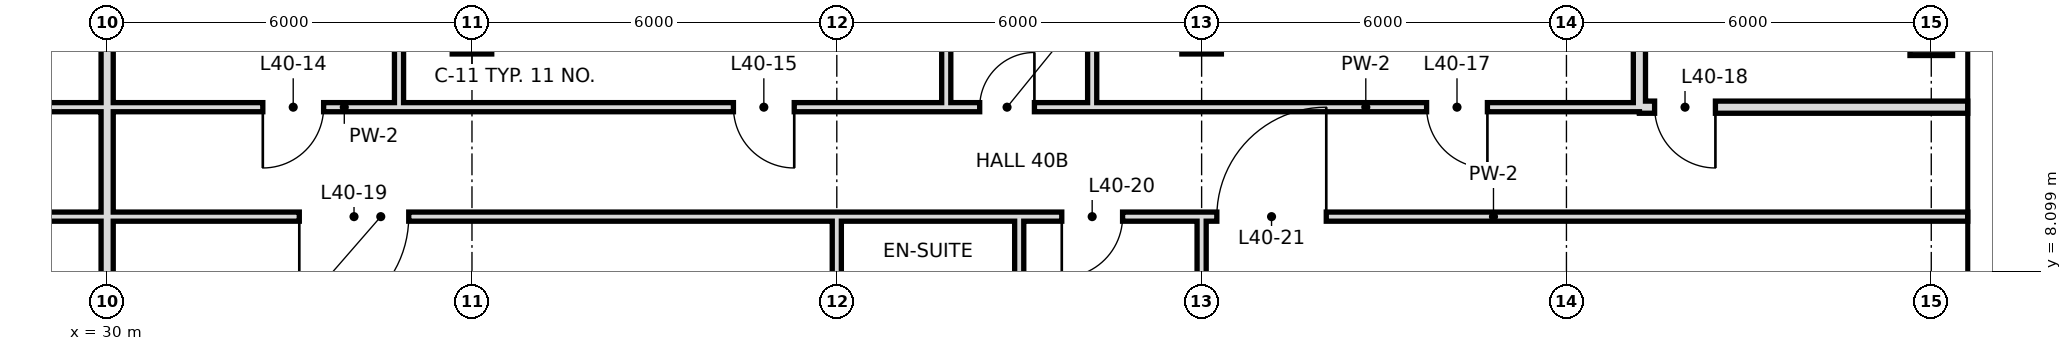
"""IFC4 building model, lengths in metres.
Left out: names, types, materials, properties, quantities, classifications, styles, units other than length and angle.
Written with IfcOpenShell. Run it as: python <this file> out.ifc"""

import sys

from ifc_helpers import new_model, si_unit, direction, frame, frame_2d, origin, origin_2d, place, context, subcontext, project, spatial, rectangle, hollow_rectangle, extrude, element, fill, save


model = new_model("IFC4")
c1 = context("Model", 3, precision=1e-05, world=origin(), true_north=direction((0.0, 1.0)))
c2 = subcontext(c1, "Body", "Model", "MODEL_VIEW")
j1 = project(units=[si_unit("LENGTHUNIT", "METRE"), si_unit("PLANEANGLEUNIT", "RADIAN")], contexts=[c1])
p1 = place(None, origin())
s1 = spatial("IfcSite", under=j1, at=p1, CompositionType="ELEMENT")
p2 = place(p1, origin())
s2 = spatial("IfcBuilding", under=s1, at=p2, CompositionType="ELEMENT")
p3 = place(p2, frame((0.0, 0.0, 174.4)))
s3 = spatial("IfcBuildingStorey", under=s2, at=p3, CompositionType="ELEMENT", Elevation=174.4)
for number, where, z_axis, x_axis in (
    (1, (36.0, 12.0, 0.0), (0.0, 0.0, 1.0), (1.0, 0.0, 0.0)),
    (2, (48.0, 12.0, 0.0), (0.0, 0.0, 1.0), (1.0, 0.0, 0.0)),
):
    element("IfcColumn", number, at=place(p3, frame(where, z_axis=z_axis, x_axis=x_axis)), inside=s3, PredefinedType="COLUMN", context=c2, shape_type="SweptSolid", body=[
        extrude(hollow_rectangle(XDim=0.65, YDim=0.65, WallThickness=0.032, at=origin_2d()), origin(), (0.0, 0.0, 1.0), 3.6),
    ])
p4 = place(p3, frame((60.0, 12.0, 0.0), z_axis=(0.0, 0.0, 1.0), x_axis=(1.0, 0.0, 0.0)))
e3 = element("IfcColumn", 3, at=p4, inside=s3, PredefinedType="COLUMN", context=c2, shape_type="SweptSolid", body=[
    extrude(hollow_rectangle(XDim=0.7, YDim=0.7, WallThickness=0.036, at=origin_2d()), origin(), (0.0, 0.0, 1.0), 3.6),
])
p5 = place(p3, frame((30.0, -0.6, 0.0), z_axis=(0.0, 0.0, 1.0), x_axis=(0.0, 1.0, 0.0)))
e4 = element("IfcWall", 4, at=p5, inside=s3, PredefinedType="SOLIDWALL", context=c2, shape_type="SweptSolid", body=[
    extrude(rectangle(XDim=15.9, YDim=0.2, at=frame_2d((7.95, 0.0))), origin(), (0.0, 0.0, 1.0), 2.72),
])
p6 = place(p3, frame((34.8, 10.8, 0.0), z_axis=(0.0, 0.0, 1.0), x_axis=(0.0, 1.0, 0.0)))
e5 = element("IfcWall", 5, at=p6, inside=s3, PredefinedType="PARTITIONING", context=c2, shape_type="SweptSolid", body=[
    extrude(rectangle(XDim=4.5, YDim=0.15, at=frame_2d((2.25, 0.0))), origin(), (0.0, 0.0, 1.0), 3.42),
])
p7 = place(p3, frame((42.0, 6.0, 0.0), z_axis=(0.0, 0.0, 1.0), x_axis=(0.0, 1.0, 0.0)))
e6 = element("IfcWall", 6, at=p7, inside=s3, PredefinedType="PARTITIONING", context=c2, shape_type="SweptSolid", body=[
    extrude(rectangle(XDim=3.0, YDim=0.15, at=frame_2d((1.5, 0.0))), origin(), (0.0, 0.0, 1.0), 2.72),
])
p8 = place(p3, frame((43.8, 10.8, 0.0), z_axis=(0.0, 0.0, 1.0), x_axis=(0.0, 1.0, 0.0)))
e7 = element("IfcWall", 7, at=p8, inside=s3, PredefinedType="PARTITIONING", context=c2, shape_type="SweptSolid", body=[
    extrude(rectangle(XDim=4.5, YDim=0.15, at=frame_2d((2.25, 0.0))), origin(), (0.0, 0.0, 1.0), 3.42),
])
p9 = place(p3, frame((45.0, 6.0, 0.0), z_axis=(0.0, 0.0, 1.0), x_axis=(0.0, 1.0, 0.0)))
e8 = element("IfcWall", 8, at=p9, inside=s3, PredefinedType="PARTITIONING", context=c2, shape_type="SweptSolid", body=[
    extrude(rectangle(XDim=3.0, YDim=0.15, at=frame_2d((1.5, 0.0))), origin(), (0.0, 0.0, 1.0), 3.42),
])
p10 = place(p3, frame((46.2, 10.8, 0.0), z_axis=(0.0, 0.0, 1.0), x_axis=(0.0, 1.0, 0.0)))
e9 = element("IfcWall", 9, at=p10, inside=s3, PredefinedType="PARTITIONING", context=c2, shape_type="SweptSolid", body=[
    extrude(rectangle(XDim=4.5, YDim=0.15, at=frame_2d((2.25, 0.0))), origin(), (0.0, 0.0, 1.0), 3.42),
])
p11 = place(p3, frame((48.0, 0.0, 0.0), z_axis=(0.0, 0.0, 1.0), x_axis=(0.0, 1.0, 0.0)))
e10 = element("IfcWall", 10, at=p11, inside=s3, PredefinedType="PARTITIONING", context=c2, shape_type="SweptSolid", body=[
    extrude(rectangle(XDim=9.0, YDim=0.15, at=frame_2d((4.5, 0.0))), origin(), (0.0, 0.0, 1.0), 2.72),
])
p12 = place(p3, frame((55.2, 10.8, 0.0), z_axis=(0.0, 0.0, 1.0), x_axis=(0.0, 1.0, 0.0)))
e11 = element("IfcWall", 11, at=p12, inside=s3, PredefinedType="SOLIDWALL", context=c2, shape_type="SweptSolid", body=[
    extrude(rectangle(XDim=7.2, YDim=0.2, at=frame_2d((3.6, 0.0))), origin(), (0.0, 0.0, 1.0), 2.72),
])
p13 = place(p3, frame((55.2, 10.8, 0.0), z_axis=(0.0, 0.0, 1.0), x_axis=(1.0, 0.0, 0.0)))
e12 = element("IfcWall", 12, at=p13, inside=s3, PredefinedType="SOLIDWALL", context=c2, shape_type="SweptSolid", body=[
    extrude(rectangle(XDim=5.4, YDim=0.2, at=frame_2d((2.7, 0.0))), origin(), (0.0, 0.0, 1.0), 2.97),
])
p14 = place(p13, frame((0.25, 0.0, 0.0)))
e13 = element("IfcOpeningElement", 13, at=p14, cuts=e12, PredefinedType="OPENING", context=c2, shape_type="SweptSolid", body=[
    extrude(rectangle(XDim=1.0, YDim=2.4, at=frame_2d((0.5, 1.2))), frame((0.0, 0.11, 0.0), z_axis=(0.0, -1.0, 0.0), x_axis=(1.0, 0.0, 0.0)), (0.0, 0.0, 1.0), 0.22),
])
p15 = place(p3, frame((24.0, 10.8, 0.0), z_axis=(0.0, 0.0, 1.0), x_axis=(1.0, 0.0, 0.0)))
e14 = element("IfcWall", 14, at=p15, inside=s3, PredefinedType="PARTITIONING", context=c2, shape_type="SweptSolid", body=[
    extrude(rectangle(XDim=19.8, YDim=0.15, at=frame_2d((9.9, 0.0))), origin(), (0.0, 0.0, 1.0), 3.42),
])
p16 = place(p15, frame((2.5, 0.0, 0.0)))
e15 = element("IfcOpeningElement", 15, at=p16, cuts=e14, PredefinedType="OPENING", context=c2, shape_type="SweptSolid", body=[
    extrude(rectangle(XDim=1.0, YDim=2.4, at=frame_2d((0.5, 1.2))), frame((0.0, 0.085, 0.0), z_axis=(0.0, -1.0, 0.0), x_axis=(1.0, 0.0, 0.0)), (0.0, 0.0, 1.0), 0.17),
])
p17 = place(p15, frame((8.56, 0.0, 0.0)))
e16 = element("IfcOpeningElement", 16, at=p17, cuts=e14, PredefinedType="OPENING", context=c2, shape_type="SweptSolid", body=[
    extrude(rectangle(XDim=1.0, YDim=2.4, at=frame_2d((0.5, 1.2))), frame((0.0, 0.085, 0.0), z_axis=(0.0, -1.0, 0.0), x_axis=(1.0, 0.0, 0.0)), (0.0, 0.0, 1.0), 0.17),
])
p18 = place(p15, frame((16.3, 0.0, 0.0)))
e17 = element("IfcOpeningElement", 17, at=p18, cuts=e14, PredefinedType="OPENING", context=c2, shape_type="SweptSolid", body=[
    extrude(rectangle(XDim=1.0, YDim=2.4, at=frame_2d((0.5, 1.2))), frame((0.0, 0.085, 0.0), z_axis=(0.0, -1.0, 0.0), x_axis=(1.0, 0.0, 0.0)), (0.0, 0.0, 1.0), 0.17),
])
p19 = place(p3, frame((46.2, 10.8, 0.0), z_axis=(0.0, 0.0, 1.0), x_axis=(1.0, 0.0, 0.0)))
e18 = element("IfcWall", 18, at=p19, inside=s3, PredefinedType="PARTITIONING", context=c2, shape_type="SweptSolid", body=[
    extrude(rectangle(XDim=9.0, YDim=0.15, at=frame_2d((4.5, 0.0))), origin(), (0.0, 0.0, 1.0), 3.42),
])
p20 = place(p19, frame((5.5, 0.0, 0.0)))
e19 = element("IfcOpeningElement", 19, at=p20, cuts=e18, PredefinedType="OPENING", context=c2, shape_type="SweptSolid", body=[
    extrude(rectangle(XDim=1.0, YDim=2.4, at=frame_2d((0.5, 1.2))), frame((0.0, 0.085, 0.0), z_axis=(0.0, -1.0, 0.0), x_axis=(1.0, 0.0, 0.0)), (0.0, 0.0, 1.0), 0.17),
])
p21 = place(p3, frame((43.8, 10.8, 0.0), z_axis=(0.0, 0.0, 1.0), x_axis=(1.0, 0.0, 0.0)))
e20 = element("IfcWall", 20, at=p21, inside=s3, PredefinedType="PARTITIONING", context=c2, shape_type="SweptSolid", body=[
    extrude(rectangle(XDim=2.4, YDim=0.15, at=frame_2d((1.2, 0.0))), origin(), (0.0, 0.0, 1.0), 3.42),
])
p22 = place(p21, frame((0.55, 0.0, 0.0)))
e21 = element("IfcOpeningElement", 21, at=p22, cuts=e20, PredefinedType="OPENING", context=c2, shape_type="SweptSolid", body=[
    extrude(rectangle(XDim=0.9, YDim=2.4, at=frame_2d((0.45, 1.2))), frame((0.0, 0.085, 0.0), z_axis=(0.0, -1.0, 0.0), x_axis=(1.0, 0.0, 0.0)), (0.0, 0.0, 1.0), 0.17),
])
p23 = place(p3, frame((27.0, 9.0, 0.0), z_axis=(0.0, 0.0, 1.0), x_axis=(1.0, 0.0, 0.0)))
e22 = element("IfcWall", 22, at=p23, inside=s3, PredefinedType="PARTITIONING", context=c2, shape_type="SweptSolid", body=[
    extrude(rectangle(XDim=15.0, YDim=0.15, at=frame_2d((7.5, 0.0))), origin(), (0.0, 0.0, 1.0), 3.42),
])
p24 = place(p23, frame((1.0, 0.0, 0.0)))
e23 = element("IfcOpeningElement", 23, at=p24, cuts=e22, PredefinedType="OPENING", context=c2, shape_type="SweptSolid", body=[
    extrude(rectangle(XDim=1.0, YDim=2.4, at=frame_2d((0.5, 1.2))), frame((0.0, 0.085, 0.0), z_axis=(0.0, -1.0, 0.0), x_axis=(1.0, 0.0, 0.0)), (0.0, 0.0, 1.0), 0.17),
])
p25 = place(p23, frame((6.16, 0.0, 0.0)))
e24 = element("IfcOpeningElement", 24, at=p25, cuts=e22, PredefinedType="OPENING", context=c2, shape_type="SweptSolid", body=[
    extrude(rectangle(XDim=1.8, YDim=2.4, at=frame_2d((0.9, 1.2))), frame((0.0, 0.085, 0.0), z_axis=(0.0, -1.0, 0.0), x_axis=(1.0, 0.0, 0.0)), (0.0, 0.0, 1.0), 0.17),
])
p26 = place(p3, frame((45.0, 9.0, 0.0), z_axis=(0.0, 0.0, 1.0), x_axis=(1.0, 0.0, 0.0)))
e25 = element("IfcWall", 25, at=p26, inside=s3, PredefinedType="PARTITIONING", context=c2, shape_type="SweptSolid", body=[
    extrude(rectangle(XDim=15.6, YDim=0.15, at=frame_2d((7.8, 0.0))), origin(), (0.0, 0.0, 1.0), 3.42),
])
p27 = place(p26, frame((0.7, 0.0, 0.0)))
e26 = element("IfcOpeningElement", 26, at=p27, cuts=e25, PredefinedType="OPENING", context=c2, shape_type="SweptSolid", body=[
    extrude(rectangle(XDim=1.0, YDim=2.4, at=frame_2d((0.5, 1.2))), frame((0.0, 0.085, 0.0), z_axis=(0.0, -1.0, 0.0), x_axis=(1.0, 0.0, 0.0)), (0.0, 0.0, 1.0), 0.17),
])
p28 = place(p26, frame((3.25, 0.0, 0.0)))
e27 = element("IfcOpeningElement", 27, at=p28, cuts=e25, PredefinedType="OPENING", context=c2, shape_type="SweptSolid", body=[
    extrude(rectangle(XDim=1.8, YDim=2.4, at=frame_2d((0.9, 1.2))), frame((0.0, 0.085, 0.0), z_axis=(0.0, -1.0, 0.0), x_axis=(1.0, 0.0, 0.0)), (0.0, 0.0, 1.0), 0.17),
])
p29 = place(p3, frame((42.0, 9.0, 0.0), z_axis=(0.0, 0.0, 1.0), x_axis=(1.0, 0.0, 0.0)))
e28 = element("IfcWall", 28, at=p29, inside=s3, PredefinedType="PARTITIONING", context=c2, shape_type="SweptSolid", body=[
    extrude(rectangle(XDim=3.0, YDim=0.15, at=frame_2d((1.5, 0.0))), origin(), (0.0, 0.0, 1.0), 3.42),
])
p30 = place(p17, frame((1.0, 0.0, 0.0), z_axis=(0.0, 0.0, 1.0), x_axis=(-1.0, 0.0, 0.0)))
e29 = element("IfcDoor", 29, at=p30, inside=s3, OperationType="SINGLE_SWING_RIGHT", PredefinedType="DOOR", context=c2, shape_type="SweptSolid", body=[
    extrude(rectangle(XDim=1.0, YDim=2.4, at=frame_2d((0.5, 1.2))), frame((0.0, 0.025, 0.0), z_axis=(0.0, -1.0, 0.0), x_axis=(1.0, 0.0, 0.0)), (0.0, 0.0, 1.0), 0.05),
])
fill(e16, e29)
p31 = place(p18, origin())
e30 = element("IfcDoor", 30, at=p31, inside=s3, OperationType="SINGLE_SWING_RIGHT", PredefinedType="DOOR", context=c2, shape_type="SweptSolid", body=[
    extrude(rectangle(XDim=1.0, YDim=2.4, at=frame_2d((0.5, 1.2))), frame((0.0, 0.025, 0.0), z_axis=(0.0, -1.0, 0.0), x_axis=(1.0, 0.0, 0.0)), (0.0, 0.0, 1.0), 0.05),
])
fill(e17, e30)
p32 = place(p22, frame((0.9, 0.0, 0.0), z_axis=(0.0, 0.0, 1.0), x_axis=(-1.0, 0.0, 0.0)))
e31 = element("IfcDoor", 31, at=p32, inside=s3, OperationType="SINGLE_SWING_LEFT", PredefinedType="DOOR", context=c2, shape_type="SweptSolid", body=[
    extrude(rectangle(XDim=0.9, YDim=2.4, at=frame_2d((0.45, 1.2))), frame((0.0, 0.025, 0.0), z_axis=(0.0, -1.0, 0.0), x_axis=(1.0, 0.0, 0.0)), (0.0, 0.0, 1.0), 0.05),
])
fill(e21, e31)
p33 = place(p20, origin())
e32 = element("IfcDoor", 32, at=p33, inside=s3, OperationType="SINGLE_SWING_RIGHT", PredefinedType="DOOR", context=c2, shape_type="SweptSolid", body=[
    extrude(rectangle(XDim=1.0, YDim=2.4, at=frame_2d((0.5, 1.2))), frame((0.0, 0.025, 0.0), z_axis=(0.0, -1.0, 0.0), x_axis=(1.0, 0.0, 0.0)), (0.0, 0.0, 1.0), 0.05),
])
fill(e19, e32)
p34 = place(p14, origin())
e33 = element("IfcDoor", 33, at=p34, inside=s3, OperationType="SINGLE_SWING_RIGHT", PredefinedType="DOOR", context=c2, shape_type="SweptSolid", body=[
    extrude(rectangle(XDim=1.0, YDim=2.4, at=frame_2d((0.5, 1.2))), frame((0.0, 0.025, 0.0), z_axis=(0.0, -1.0, 0.0), x_axis=(1.0, 0.0, 0.0)), (0.0, 0.0, 1.0), 0.05),
])
fill(e13, e33)
p35 = place(p25, frame((1.8, 0.0, 0.0), z_axis=(0.0, 0.0, 1.0), x_axis=(-1.0, 0.0, 0.0)))
e34 = element("IfcDoor", 34, at=p35, inside=s3, OperationType="SINGLE_SWING_RIGHT", PredefinedType="DOOR", context=c2, shape_type="SweptSolid", body=[
    extrude(rectangle(XDim=1.8, YDim=2.4, at=frame_2d((0.9, 1.2))), frame((0.0, 0.025, 0.0), z_axis=(0.0, -1.0, 0.0), x_axis=(1.0, 0.0, 0.0)), (0.0, 0.0, 1.0), 0.05),
])
fill(e24, e34)
p36 = place(p27, frame((1.0, 0.0, 0.0), z_axis=(0.0, 0.0, 1.0), x_axis=(-1.0, 0.0, 0.0)))
e35 = element("IfcDoor", 35, at=p36, inside=s3, OperationType="SINGLE_SWING_RIGHT", PredefinedType="DOOR", context=c2, shape_type="SweptSolid", body=[
    extrude(rectangle(XDim=1.0, YDim=2.4, at=frame_2d((0.5, 1.2))), frame((0.0, 0.025, 0.0), z_axis=(0.0, -1.0, 0.0), x_axis=(1.0, 0.0, 0.0)), (0.0, 0.0, 1.0), 0.05),
])
fill(e26, e35)
p37 = place(p28, frame((1.8, 0.0, 0.0), z_axis=(0.0, 0.0, 1.0), x_axis=(-1.0, 0.0, 0.0)))
e36 = element("IfcDoor", 36, at=p37, inside=s3, OperationType="SINGLE_SWING_LEFT", PredefinedType="DOOR", context=c2, shape_type="SweptSolid", body=[
    extrude(rectangle(XDim=1.8, YDim=2.4, at=frame_2d((0.9, 1.2))), frame((0.0, 0.025, 0.0), z_axis=(0.0, -1.0, 0.0), x_axis=(1.0, 0.0, 0.0)), (0.0, 0.0, 1.0), 0.05),
])
fill(e27, e36)
save(model, sys.argv[1])
